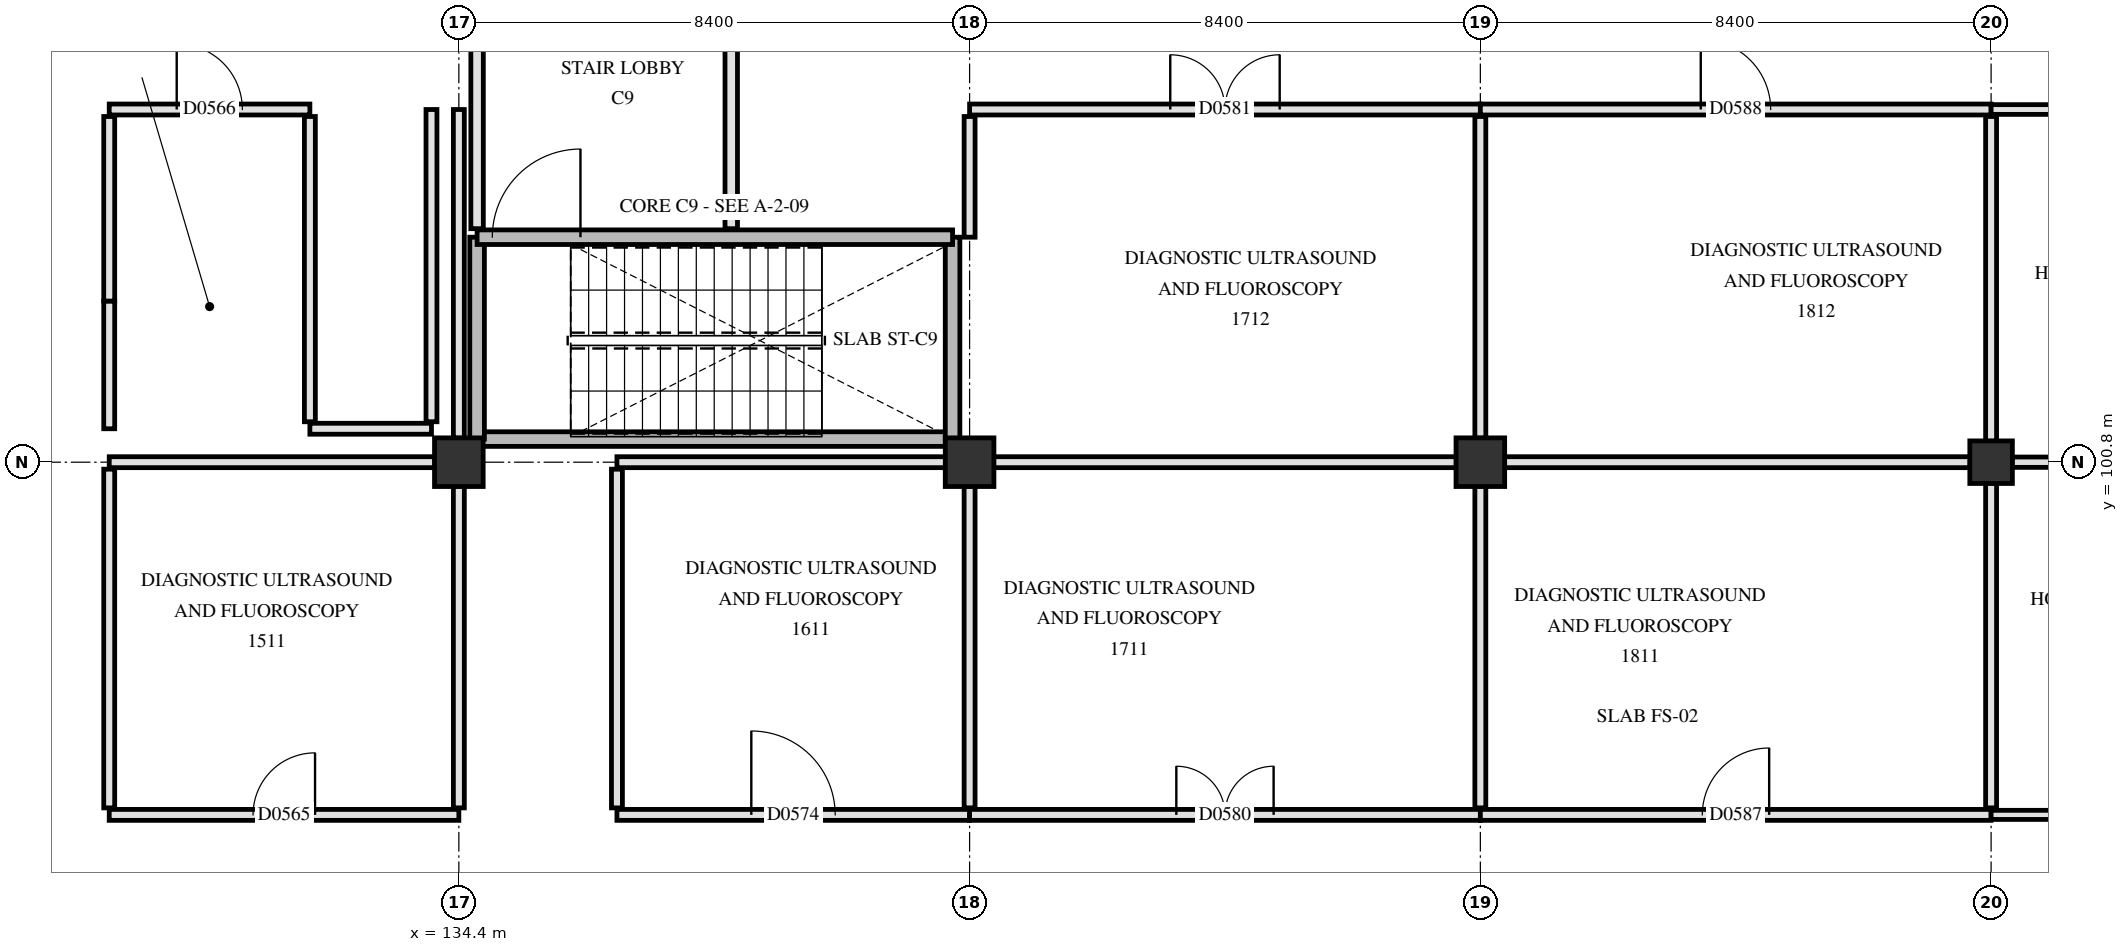
"""IFC4 building model, lengths in metres.
Left out: names, types, materials, properties, quantities, classifications, styles, units other than length and angle.
Written with IfcOpenShell. Run it as: python <this file> out.ifc"""

import sys

from ifc_helpers import new_model, si_unit, direction, frame, frame_2d, origin, origin_2d, place, context, subcontext, project, spatial, rectangle, extrude, element, fill, save


model = new_model("IFC4")
c1 = context("Model", 3, precision=1e-05, world=origin(), true_north=direction((0.0, 1.0)))
c2 = subcontext(c1, "Body", "Model", "MODEL_VIEW")
j1 = project(units=[si_unit("LENGTHUNIT", "METRE"), si_unit("PLANEANGLEUNIT", "RADIAN")], contexts=[c1])
p1 = place(None, origin())
s1 = spatial("IfcSite", under=j1, at=p1, CompositionType="ELEMENT")
p2 = place(p1, origin())
s2 = spatial("IfcBuilding", under=s1, at=p2, CompositionType="ELEMENT")
p3 = place(p2, origin())
s3 = spatial("IfcBuildingStorey", under=s2, at=p3, CompositionType="ELEMENT", Elevation=0.0)
for number, where, z_axis, x_axis in (
    (1, (134.4, 100.8, 0.0), (0.0, 0.0, 1.0), (1.0, 0.0, 0.0)),
    (2, (142.8, 100.8, 0.0), (0.0, 0.0, 1.0), (1.0, 0.0, 0.0)),
    (3, (151.2, 100.8, 0.0), (0.0, 0.0, 1.0), (1.0, 0.0, 0.0)),
):
    element("IfcColumn", number, at=place(p3, frame(where, z_axis=z_axis, x_axis=x_axis)), inside=s3, PredefinedType="COLUMN", context=c2, shape_type="SweptSolid", body=[
        extrude(rectangle(XDim=0.8, YDim=0.8, at=origin_2d()), origin(), (0.0, 0.0, 1.0), 4.8),
    ])
p4 = place(p3, frame((159.6, 100.8, 0.0), z_axis=(0.0, 0.0, 1.0), x_axis=(1.0, 0.0, 0.0)))
e4 = element("IfcColumn", 4, at=p4, inside=s3, PredefinedType="COLUMN", context=c2, shape_type="SweptSolid", body=[
    extrude(rectangle(XDim=0.7, YDim=0.7, at=origin_2d()), origin(), (0.0, 0.0, 1.0), 4.8),
])
p5 = place(p3, frame((134.7, 101.18, 0.0), z_axis=(0.0, 0.0, 1.0), x_axis=(1.0, 0.0, 0.0)))
e5 = element("IfcWall", 5, at=p5, inside=s3, PredefinedType="SHEAR", context=c2, shape_type="SweptSolid", body=[
    extrude(rectangle(XDim=7.82, YDim=0.24, at=frame_2d((3.91, 0.0))), origin(), (0.0, 0.0, 1.0), 4.5),
])
for number, where, z_axis, x_axis in (
    (6, (134.7, 101.18, 0.0), (0.0, 0.0, 1.0), (0.0, 1.0, 0.0)),
    (7, (142.52, 101.18, 0.0), (0.0, 0.0, 1.0), (0.0, 1.0, 0.0)),
):
    element("IfcWall", number, at=place(p3, frame(where, z_axis=z_axis, x_axis=x_axis)), inside=s3, PredefinedType="SHEAR", context=c2, shape_type="SweptSolid", body=[
        extrude(rectangle(XDim=3.32, YDim=0.24, at=frame_2d((1.66, 0.0))), origin(), (0.0, 0.0, 1.0), 4.5),
    ])
p6 = place(p3, frame((134.7, 104.5, 0.0), z_axis=(0.0, 0.0, 1.0), x_axis=(1.0, 0.0, 0.0)))
e8 = element("IfcWall", 8, at=p6, inside=s3, PredefinedType="SHEAR", context=c2, shape_type="SweptSolid", body=[
    extrude(rectangle(XDim=7.82, YDim=0.24, at=frame_2d((3.91, 0.0))), origin(), (0.0, 0.0, 1.0), 4.5),
])
p7 = place(p6, frame((0.25, 0.0, 0.0)))
e9 = element("IfcOpeningElement", 9, at=p7, cuts=e8, PredefinedType="OPENING", context=c2, shape_type="SweptSolid", body=[
    extrude(rectangle(XDim=1.45, YDim=2.2, at=frame_2d((0.725, 1.1))), frame((0.0, 0.13, 0.0), z_axis=(0.0, -1.0, 0.0), x_axis=(1.0, 0.0, 0.0)), (0.0, 0.0, 1.0), 0.26),
])
p8 = place(p3, frame((138.88, 104.64, 0.0), z_axis=(0.0, 0.0, 1.0), x_axis=(0.0, 1.0, 0.0)))
e10 = element("IfcWall", 10, at=p8, inside=s3, PredefinedType="PARTITIONING", context=c2, shape_type="SweptSolid", body=[
    extrude(rectangle(XDim=4.12, YDim=0.205, at=frame_2d((2.06, 0.0))), origin(), (0.0, 0.0, 1.0), 4.49),
])
p9 = place(p3, frame((134.7, 104.64, 0.0), z_axis=(0.0, 0.0, 1.0), x_axis=(0.0, 1.0, 0.0)))
e11 = element("IfcWall", 11, at=p9, inside=s3, PredefinedType="PARTITIONING", context=c2, shape_type="SweptSolid", body=[
    extrude(rectangle(XDim=4.12, YDim=0.205, at=frame_2d((2.06, 0.0))), origin(), (0.0, 0.0, 1.0), 3.89),
])
p10 = place(p3, frame((128.65, 95.0, 0.0), z_axis=(0.0, 0.0, 1.0), x_axis=(1.0, 0.0, 0.0)))
e12 = element("IfcWall", 12, at=p10, inside=s3, PredefinedType="PARTITIONING", context=c2, shape_type="SweptSolid", body=[
    extrude(rectangle(XDim=5.75, YDim=0.18, at=frame_2d((2.875, 0.0))), origin(), (0.0, 0.0, 1.0), 3.89),
])
p11 = place(p10, frame((2.365, 0.0, 0.0)))
e13 = element("IfcOpeningElement", 13, at=p11, cuts=e12, PredefinedType="OPENING", context=c2, shape_type="SweptSolid", body=[
    extrude(rectangle(XDim=1.02, YDim=2.12, at=frame_2d((0.51, 1.06))), frame((0.0, 0.1, 0.0), z_axis=(0.0, -1.0, 0.0), x_axis=(1.0, 0.0, 0.0)), (0.0, 0.0, 1.0), 0.2),
])
p12 = place(p3, frame((137.0, 95.0, 0.0), z_axis=(0.0, 0.0, 1.0), x_axis=(1.0, 0.0, 0.0)))
e14 = element("IfcWall", 14, at=p12, inside=s3, PredefinedType="PARTITIONING", context=c2, shape_type="SweptSolid", body=[
    extrude(rectangle(XDim=5.8, YDim=0.18, at=frame_2d((2.9, 0.0))), origin(), (0.0, 0.0, 1.0), 3.89),
])
p13 = place(p12, frame((2.21, 0.0, 0.0)))
e15 = element("IfcOpeningElement", 15, at=p13, cuts=e14, PredefinedType="OPENING", context=c2, shape_type="SweptSolid", body=[
    extrude(rectangle(XDim=1.38, YDim=2.22, at=frame_2d((0.69, 1.11))), frame((0.0, 0.1, 0.0), z_axis=(0.0, -1.0, 0.0), x_axis=(1.0, 0.0, 0.0)), (0.0, 0.0, 1.0), 0.2),
])
p14 = place(p3, frame((142.8, 95.0, 0.0), z_axis=(0.0, 0.0, 1.0), x_axis=(1.0, 0.0, 0.0)))
e16 = element("IfcWall", 16, at=p14, inside=s3, PredefinedType="PARTITIONING", context=c2, shape_type="SweptSolid", body=[
    extrude(rectangle(XDim=8.4, YDim=0.18, at=frame_2d((4.2, 0.0))), origin(), (0.0, 0.0, 1.0), 3.89),
])
p15 = place(p14, frame((3.4, 0.0, 0.0)))
e17 = element("IfcOpeningElement", 17, at=p15, cuts=e16, PredefinedType="OPENING", context=c2, shape_type="SweptSolid", body=[
    extrude(rectangle(XDim=1.6, YDim=2.25, at=frame_2d((0.8, 1.125))), frame((0.0, 0.1, 0.0), z_axis=(0.0, -1.0, 0.0), x_axis=(1.0, 0.0, 0.0)), (0.0, 0.0, 1.0), 0.2),
])
p16 = place(p3, frame((151.2, 95.0, 0.0), z_axis=(0.0, 0.0, 1.0), x_axis=(1.0, 0.0, 0.0)))
e18 = element("IfcWall", 18, at=p16, inside=s3, PredefinedType="PARTITIONING", context=c2, shape_type="SweptSolid", body=[
    extrude(rectangle(XDim=8.4, YDim=0.18, at=frame_2d((4.2, 0.0))), origin(), (0.0, 0.0, 1.0), 3.89),
])
p17 = place(p16, frame((3.65, 0.0, 0.0)))
e19 = element("IfcOpeningElement", 19, at=p17, cuts=e18, PredefinedType="OPENING", context=c2, shape_type="SweptSolid", body=[
    extrude(rectangle(XDim=1.1, YDim=2.15, at=frame_2d((0.55, 1.075))), frame((0.0, 0.1, 0.0), z_axis=(0.0, -1.0, 0.0), x_axis=(1.0, 0.0, 0.0)), (0.0, 0.0, 1.0), 0.2),
])
p18 = place(p3, frame((159.6, 95.0, 0.0), z_axis=(0.0, 0.0, 1.0), x_axis=(1.0, 0.0, 0.0)))
e20 = element("IfcWall", 20, at=p18, inside=s3, PredefinedType="PARTITIONING", context=c2, shape_type="SweptSolid", body=[
    extrude(rectangle(XDim=8.4, YDim=0.15, at=frame_2d((4.2, 0.0))), origin(), (0.0, 0.0, 1.0), 3.89),
])
p19 = place(p18, frame((3.38, 0.0, 0.0)))
e21 = element("IfcOpeningElement", 21, at=p19, cuts=e20, PredefinedType="OPENING", context=c2, shape_type="SweptSolid", body=[
    extrude(rectangle(XDim=1.64, YDim=2.28, at=frame_2d((0.82, 1.14))), frame((0.0, 0.085, 0.0), z_axis=(0.0, -1.0, 0.0), x_axis=(1.0, 0.0, 0.0)), (0.0, 0.0, 1.0), 0.17),
])
p20 = place(p3, frame((128.65, 100.8, 0.0), z_axis=(0.0, 0.0, 1.0), x_axis=(1.0, 0.0, 0.0)))
e22 = element("IfcWall", 22, at=p20, inside=s3, PredefinedType="PARTITIONING", context=c2, shape_type="SweptSolid", body=[
    extrude(rectangle(XDim=5.355, YDim=0.18, at=frame_2d((2.677, 0.0))), origin(), (0.0, 0.0, 1.0), 3.84),
])
p21 = place(p3, frame((137.0, 100.8, 0.0), z_axis=(0.0, 0.0, 1.0), x_axis=(1.0, 0.0, 0.0)))
e23 = element("IfcWall", 23, at=p21, inside=s3, PredefinedType="PARTITIONING", context=c2, shape_type="SweptSolid", body=[
    extrude(rectangle(XDim=5.405, YDim=0.18, at=frame_2d((2.703, 0.0))), origin(), (0.0, 0.0, 1.0), 3.84),
])
p22 = place(p3, frame((143.195, 100.8, 0.0), z_axis=(0.0, 0.0, 1.0), x_axis=(1.0, 0.0, 0.0)))
e24 = element("IfcWall", 24, at=p22, inside=s3, PredefinedType="PARTITIONING", context=c2, shape_type="SweptSolid", body=[
    extrude(rectangle(XDim=7.61, YDim=0.18, at=frame_2d((3.805, 0.0))), origin(), (0.0, 0.0, 1.0), 3.84),
])
p23 = place(p3, frame((151.595, 100.8, 0.0), z_axis=(0.0, 0.0, 1.0), x_axis=(1.0, 0.0, 0.0)))
e25 = element("IfcWall", 25, at=p23, inside=s3, PredefinedType="PARTITIONING", context=c2, shape_type="SweptSolid", body=[
    extrude(rectangle(XDim=7.66, YDim=0.18, at=frame_2d((3.83, 0.0))), origin(), (0.0, 0.0, 1.0), 3.84),
])
p24 = place(p3, frame((159.945, 100.8, 0.0), z_axis=(0.0, 0.0, 1.0), x_axis=(1.0, 0.0, 0.0)))
e26 = element("IfcWall", 26, at=p24, inside=s3, PredefinedType="PARTITIONING", context=c2, shape_type="SweptSolid", body=[
    extrude(rectangle(XDim=7.71, YDim=0.17, at=frame_2d((3.855, 0.0))), origin(), (0.0, 0.0, 1.0), 3.84),
])
p25 = place(p3, frame((131.95, 101.35, 0.0), z_axis=(0.0, 0.0, 1.0), x_axis=(1.0, 0.0, 0.0)))
e27 = element("IfcWall", 27, at=p25, inside=s3, PredefinedType="PARTITIONING", context=c2, shape_type="SweptSolid", body=[
    extrude(rectangle(XDim=2.0, YDim=0.18, at=frame_2d((1.0, 0.0))), origin(), (0.0, 0.0, 1.0), 4.49),
])
p26 = place(p3, frame((128.65, 106.6, 0.0), z_axis=(0.0, 0.0, 1.0), x_axis=(1.0, 0.0, 0.0)))
e28 = element("IfcWall", 28, at=p26, inside=s3, PredefinedType="PARTITIONING", context=c2, shape_type="SweptSolid", body=[
    extrude(rectangle(XDim=3.3, YDim=0.18, at=frame_2d((1.65, 0.0))), origin(), (0.0, 0.0, 1.0), 4.49),
])
p27 = place(p26, frame((1.11, 0.0, 0.0)))
e29 = element("IfcOpeningElement", 29, at=p27, cuts=e28, PredefinedType="OPENING", context=c2, shape_type="SweptSolid", body=[
    extrude(rectangle(XDim=1.08, YDim=2.12, at=frame_2d((0.54, 1.06))), frame((0.0, 0.1, 0.0), z_axis=(0.0, -1.0, 0.0), x_axis=(1.0, 0.0, 0.0)), (0.0, 0.0, 1.0), 0.2),
])
p28 = place(p3, frame((142.8, 106.6, 0.0), z_axis=(0.0, 0.0, 1.0), x_axis=(1.0, 0.0, 0.0)))
e30 = element("IfcWall", 30, at=p28, inside=s3, PredefinedType="PARTITIONING", context=c2, shape_type="SweptSolid", body=[
    extrude(rectangle(XDim=8.4, YDim=0.18, at=frame_2d((4.2, 0.0))), origin(), (0.0, 0.0, 1.0), 3.89),
])
p29 = place(p28, frame((3.3, 0.0, 0.0)))
e31 = element("IfcOpeningElement", 31, at=p29, cuts=e30, PredefinedType="OPENING", context=c2, shape_type="SweptSolid", body=[
    extrude(rectangle(XDim=1.8, YDim=2.25, at=frame_2d((0.9, 1.125))), frame((0.0, 0.1, 0.0), z_axis=(0.0, -1.0, 0.0), x_axis=(1.0, 0.0, 0.0)), (0.0, 0.0, 1.0), 0.2),
])
p30 = place(p3, frame((151.2, 106.6, 0.0), z_axis=(0.0, 0.0, 1.0), x_axis=(1.0, 0.0, 0.0)))
e32 = element("IfcWall", 32, at=p30, inside=s3, PredefinedType="PARTITIONING", context=c2, shape_type="SweptSolid", body=[
    extrude(rectangle(XDim=8.4, YDim=0.18, at=frame_2d((4.2, 0.0))), origin(), (0.0, 0.0, 1.0), 3.89),
])
p31 = place(p30, frame((3.625, 0.0, 0.0)))
e33 = element("IfcOpeningElement", 33, at=p31, cuts=e32, PredefinedType="OPENING", context=c2, shape_type="SweptSolid", body=[
    extrude(rectangle(XDim=1.15, YDim=2.15, at=frame_2d((0.575, 1.075))), frame((0.0, 0.1, 0.0), z_axis=(0.0, -1.0, 0.0), x_axis=(1.0, 0.0, 0.0)), (0.0, 0.0, 1.0), 0.2),
])
p32 = place(p3, frame((159.6, 106.6, 0.0), z_axis=(0.0, 0.0, 1.0), x_axis=(1.0, 0.0, 0.0)))
e34 = element("IfcWall", 34, at=p32, inside=s3, PredefinedType="PARTITIONING", context=c2, shape_type="SweptSolid", body=[
    extrude(rectangle(XDim=8.4, YDim=0.16, at=frame_2d((4.2, 0.0))), origin(), (0.0, 0.0, 1.0), 3.89),
])
p33 = place(p32, frame((3.33, 0.0, 0.0)))
e35 = element("IfcOpeningElement", 35, at=p33, cuts=e34, PredefinedType="OPENING", context=c2, shape_type="SweptSolid", body=[
    extrude(rectangle(XDim=1.74, YDim=2.24, at=frame_2d((0.87, 1.12))), frame((0.0, 0.09, 0.0), z_axis=(0.0, -1.0, 0.0), x_axis=(1.0, 0.0, 0.0)), (0.0, 0.0, 1.0), 0.18),
])
p34 = place(p3, frame((128.65, 95.115, 0.0), z_axis=(0.0, 0.0, 1.0), x_axis=(0.0, 1.0, 0.0)))
e36 = element("IfcWall", 36, at=p34, inside=s3, PredefinedType="PARTITIONING", context=c2, shape_type="SweptSolid", body=[
    extrude(rectangle(XDim=5.57, YDim=0.18, at=frame_2d((2.785, 0.0))), origin(), (0.0, 0.0, 1.0), 3.84),
])
p35 = place(p3, frame((128.65, 101.35, 0.0), z_axis=(0.0, 0.0, 1.0), x_axis=(0.0, 1.0, 0.0)))
e37 = element("IfcWall", 37, at=p35, inside=s3, PredefinedType="PARTITIONING", context=c2, shape_type="SweptSolid", body=[
    extrude(rectangle(XDim=2.1, YDim=0.18, at=frame_2d((1.05, 0.0))), origin(), (0.0, 0.0, 1.0), 4.49),
])
p36 = place(p3, frame((128.65, 103.45, 0.0), z_axis=(0.0, 0.0, 1.0), x_axis=(0.0, 1.0, 0.0)))
e38 = element("IfcWall", 38, at=p36, inside=s3, PredefinedType="PARTITIONING", context=c2, shape_type="SweptSolid", body=[
    extrude(rectangle(XDim=3.035, YDim=0.18, at=frame_2d((1.518, 0.0))), origin(), (0.0, 0.0, 1.0), 4.49),
])
p37 = place(p3, frame((131.95, 101.465, 0.0), z_axis=(0.0, 0.0, 1.0), x_axis=(0.0, 1.0, 0.0)))
e39 = element("IfcWall", 39, at=p37, inside=s3, PredefinedType="PARTITIONING", context=c2, shape_type="SweptSolid", body=[
    extrude(rectangle(XDim=5.02, YDim=0.18, at=frame_2d((2.51, 0.0))), origin(), (0.0, 0.0, 1.0), 4.49),
])
p38 = place(p3, frame((133.95, 101.465, 0.0), z_axis=(0.0, 0.0, 1.0), x_axis=(0.0, 1.0, 0.0)))
e40 = element("IfcWall", 40, at=p38, inside=s3, PredefinedType="PARTITIONING", context=c2, shape_type="SweptSolid", body=[
    extrude(rectangle(XDim=5.135, YDim=0.18, at=frame_2d((2.567, 0.0))), origin(), (0.0, 0.0, 1.0), 4.49),
])
p39 = place(p3, frame((134.4, 95.115, 0.0), z_axis=(0.0, 0.0, 1.0), x_axis=(0.0, 1.0, 0.0)))
e41 = element("IfcWall", 41, at=p39, inside=s3, PredefinedType="PARTITIONING", context=c2, shape_type="SweptSolid", body=[
    extrude(rectangle(XDim=5.29, YDim=0.18, at=frame_2d((2.645, 0.0))), origin(), (0.0, 0.0, 1.0), 3.89),
])
p40 = place(p3, frame((134.4, 101.195, 0.0), z_axis=(0.0, 0.0, 1.0), x_axis=(0.0, 1.0, 0.0)))
e42 = element("IfcWall", 42, at=p40, inside=s3, PredefinedType="PARTITIONING", context=c2, shape_type="SweptSolid", body=[
    extrude(rectangle(XDim=5.405, YDim=0.18, at=frame_2d((2.703, 0.0))), origin(), (0.0, 0.0, 1.0), 3.89),
])
p41 = place(p3, frame((137.0, 95.115, 0.0), z_axis=(0.0, 0.0, 1.0), x_axis=(0.0, 1.0, 0.0)))
e43 = element("IfcWall", 43, at=p41, inside=s3, PredefinedType="PARTITIONING", context=c2, shape_type="SweptSolid", body=[
    extrude(rectangle(XDim=5.57, YDim=0.18, at=frame_2d((2.785, 0.0))), origin(), (0.0, 0.0, 1.0), 3.84),
])
p42 = place(p3, frame((142.8, 95.115, 0.0), z_axis=(0.0, 0.0, 1.0), x_axis=(0.0, 1.0, 0.0)))
e44 = element("IfcWall", 44, at=p42, inside=s3, PredefinedType="PARTITIONING", context=c2, shape_type="SweptSolid", body=[
    extrude(rectangle(XDim=5.29, YDim=0.18, at=frame_2d((2.645, 0.0))), origin(), (0.0, 0.0, 1.0), 3.89),
])
p43 = place(p3, frame((142.8, 104.5, 0.0), z_axis=(0.0, 0.0, 1.0), x_axis=(0.0, 1.0, 0.0)))
e45 = element("IfcWall", 45, at=p43, inside=s3, PredefinedType="PARTITIONING", context=c2, shape_type="SweptSolid", body=[
    extrude(rectangle(XDim=1.985, YDim=0.18, at=frame_2d((0.993, 0.0))), origin(), (0.0, 0.0, 1.0), 3.89),
])
for number, where, z_axis, x_axis in (
    (46, (151.2, 95.115, 0.0), (0.0, 0.0, 1.0), (0.0, 1.0, 0.0)),
    (47, (151.2, 101.195, 0.0), (0.0, 0.0, 1.0), (0.0, 1.0, 0.0)),
):
    element("IfcWall", number, at=place(p3, frame(where, z_axis=z_axis, x_axis=x_axis)), inside=s3, PredefinedType="PARTITIONING", context=c2, shape_type="SweptSolid", body=[
        extrude(rectangle(XDim=5.29, YDim=0.18, at=frame_2d((2.645, 0.0))), origin(), (0.0, 0.0, 1.0), 3.89),
    ])
for number, where, z_axis, x_axis in (
    (48, (159.6, 95.115, 0.0), (0.0, 0.0, 1.0), (0.0, 1.0, 0.0)),
    (49, (159.6, 101.145, 0.0), (0.0, 0.0, 1.0), (0.0, 1.0, 0.0)),
):
    element("IfcWall", number, at=place(p3, frame(where, z_axis=z_axis, x_axis=x_axis)), inside=s3, PredefinedType="PARTITIONING", context=c2, shape_type="SweptSolid", body=[
        extrude(rectangle(XDim=5.34, YDim=0.18, at=frame_2d((2.67, 0.0))), origin(), (0.0, 0.0, 1.0), 3.89),
    ])
p44 = place(p7, origin())
e50 = element("IfcDoor", 50, at=p44, inside=s3, OperationType="SINGLE_SWING_RIGHT", PredefinedType="DOOR", context=c2, shape_type="SweptSolid", body=[
    extrude(rectangle(XDim=1.45, YDim=2.2, at=frame_2d((0.725, 1.1))), frame((0.0, 0.025, 0.0), z_axis=(0.0, -1.0, 0.0), x_axis=(1.0, 0.0, 0.0)), (0.0, 0.0, 1.0), 0.05),
])
fill(e9, e50)
p45 = place(p11, origin())
e51 = element("IfcDoor", 51, at=p45, inside=s3, OperationType="SINGLE_SWING_RIGHT", PredefinedType="DOOR", context=c2, shape_type="SweptSolid", body=[
    extrude(rectangle(XDim=1.02, YDim=2.12, at=frame_2d((0.51, 1.06))), frame((0.0, 0.025, 0.0), z_axis=(0.0, -1.0, 0.0), x_axis=(1.0, 0.0, 0.0)), (0.0, 0.0, 1.0), 0.05),
])
fill(e13, e51)
p46 = place(p27, origin())
e52 = element("IfcDoor", 52, at=p46, inside=s3, OperationType="SINGLE_SWING_LEFT", PredefinedType="DOOR", context=c2, shape_type="SweptSolid", body=[
    extrude(rectangle(XDim=1.08, YDim=2.12, at=frame_2d((0.54, 1.06))), frame((0.0, 0.025, 0.0), z_axis=(0.0, -1.0, 0.0), x_axis=(1.0, 0.0, 0.0)), (0.0, 0.0, 1.0), 0.05),
])
fill(e29, e52)
p47 = place(p13, origin())
e53 = element("IfcDoor", 53, at=p47, inside=s3, OperationType="SINGLE_SWING_LEFT", PredefinedType="DOOR", context=c2, shape_type="SweptSolid", body=[
    extrude(rectangle(XDim=1.38, YDim=2.22, at=frame_2d((0.69, 1.11))), frame((0.0, 0.025, 0.0), z_axis=(0.0, -1.0, 0.0), x_axis=(1.0, 0.0, 0.0)), (0.0, 0.0, 1.0), 0.05),
])
fill(e15, e53)
p48 = place(p15, origin())
e54 = element("IfcDoor", 54, at=p48, inside=s3, OperationType="DOUBLE_SWING_LEFT", PredefinedType="DOOR", context=c2, shape_type="SweptSolid", body=[
    extrude(rectangle(XDim=1.6, YDim=2.25, at=frame_2d((0.8, 1.125))), frame((0.0, 0.025, 0.0), z_axis=(0.0, -1.0, 0.0), x_axis=(1.0, 0.0, 0.0)), (0.0, 0.0, 1.0), 0.05),
])
fill(e17, e54)
p49 = place(p29, origin())
e55 = element("IfcDoor", 55, at=p49, inside=s3, OperationType="DOUBLE_SWING_RIGHT", PredefinedType="DOOR", context=c2, shape_type="SweptSolid", body=[
    extrude(rectangle(XDim=1.8, YDim=2.25, at=frame_2d((0.9, 1.125))), frame((0.0, 0.025, 0.0), z_axis=(0.0, -1.0, 0.0), x_axis=(1.0, 0.0, 0.0)), (0.0, 0.0, 1.0), 0.05),
])
fill(e31, e55)
p50 = place(p17, origin())
e56 = element("IfcDoor", 56, at=p50, inside=s3, OperationType="SINGLE_SWING_RIGHT", PredefinedType="DOOR", context=c2, shape_type="SweptSolid", body=[
    extrude(rectangle(XDim=1.1, YDim=2.15, at=frame_2d((0.55, 1.075))), frame((0.0, 0.025, 0.0), z_axis=(0.0, -1.0, 0.0), x_axis=(1.0, 0.0, 0.0)), (0.0, 0.0, 1.0), 0.05),
])
fill(e19, e56)
p51 = place(p31, origin())
e57 = element("IfcDoor", 57, at=p51, inside=s3, OperationType="SINGLE_SWING_LEFT", PredefinedType="DOOR", context=c2, shape_type="SweptSolid", body=[
    extrude(rectangle(XDim=1.15, YDim=2.15, at=frame_2d((0.575, 1.075))), frame((0.0, 0.025, 0.0), z_axis=(0.0, -1.0, 0.0), x_axis=(1.0, 0.0, 0.0)), (0.0, 0.0, 1.0), 0.05),
])
fill(e33, e57)
save(model, sys.argv[1])
